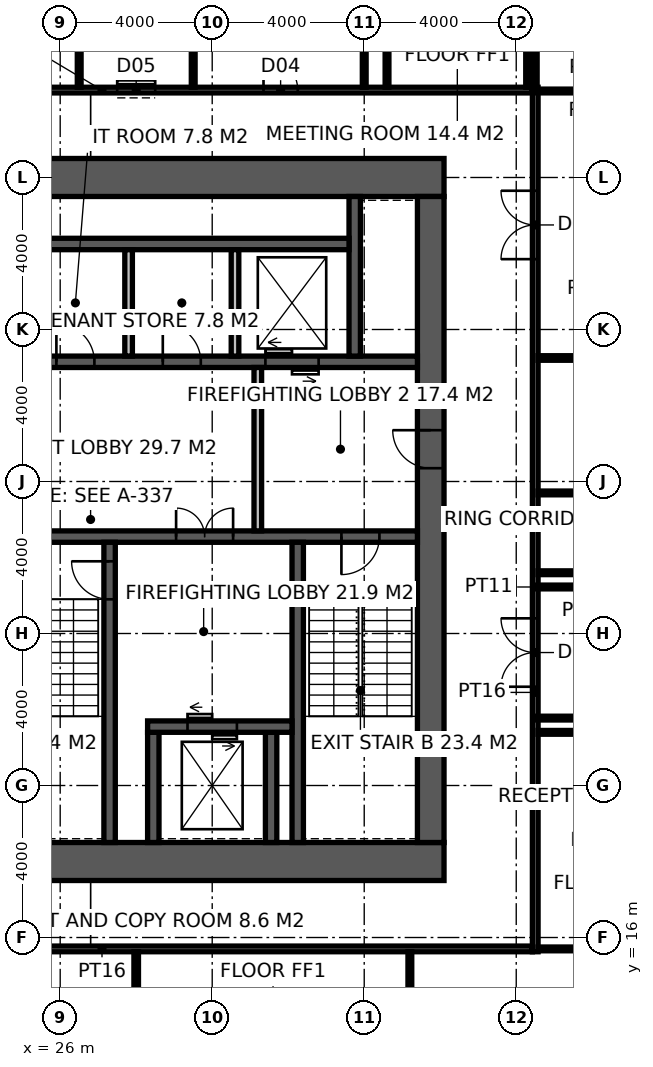
"""IFC4 building model, lengths in metres.
Left out: names, types, materials, properties, quantities, classifications, styles, units other than length and angle.
Written with IfcOpenShell. Run it as: python <this file> out.ifc"""

import sys

from ifc_helpers import new_model, si_unit, direction, frame, frame_2d, origin, place, context, subcontext, project, spatial, rectangle, extrude, element, fill, save


model = new_model("IFC4")
c1 = context("Model", 3, precision=1e-05, world=origin(), true_north=direction((0.0, 1.0)))
c2 = subcontext(c1, "Body", "Model", "MODEL_VIEW")
j1 = project(units=[si_unit("LENGTHUNIT", "METRE"), si_unit("PLANEANGLEUNIT", "RADIAN")], contexts=[c1])
p1 = place(None, origin())
s1 = spatial("IfcSite", under=j1, at=p1, CompositionType="ELEMENT")
p2 = place(p1, origin())
s2 = spatial("IfcBuilding", under=s1, at=p2, CompositionType="ELEMENT")
p3 = place(p2, frame((0.0, 0.0, 234.2)))
s3 = spatial("IfcBuildingStorey", under=s2, at=p3, CompositionType="ELEMENT", Elevation=234.2)
p4 = place(p3, frame((18.5, 18.0, -0.15), z_axis=(0.0, 0.0, 1.0), x_axis=(1.0, 0.0, 0.0)))
e1 = element("IfcWall", 1, at=p4, inside=s3, PredefinedType="SHEAR", context=c2, shape_type="SweptSolid", body=[
    extrude(rectangle(XDim=17.6, YDim=1.0, at=frame_2d((8.8, 0.0))), origin(), (0.0, 0.0, 1.0), 4.0),
])
p5 = place(p4, frame((3.45, 0.0, 0.15)))
e2 = element("IfcOpeningElement", 2, at=p5, cuts=e1, PredefinedType="OPENING", context=c2, shape_type="SweptSolid", body=[
    extrude(rectangle(XDim=1.5, YDim=2.4, at=frame_2d((0.75, 1.2))), frame((0.0, 0.51, 0.0), z_axis=(0.0, -1.0, 0.0), x_axis=(1.0, 0.0, 0.0)), (0.0, 0.0, 1.0), 1.02),
])
p6 = place(p3, frame((18.5, 36.0, -0.15), z_axis=(0.0, 0.0, 1.0), x_axis=(1.0, 0.0, 0.0)))
e3 = element("IfcWall", 3, at=p6, inside=s3, PredefinedType="SHEAR", context=c2, shape_type="SweptSolid", body=[
    extrude(rectangle(XDim=17.6, YDim=1.0, at=frame_2d((8.8, 0.0))), origin(), (0.0, 0.0, 1.0), 4.0),
])
p7 = place(p3, frame((35.75, 18.5, -0.15), z_axis=(0.0, 0.0, 1.0), x_axis=(0.0, 1.0, 0.0)))
e4 = element("IfcWall", 4, at=p7, inside=s3, PredefinedType="SHEAR", context=c2, shape_type="SweptSolid", body=[
    extrude(rectangle(XDim=17.0, YDim=0.7, at=frame_2d((8.5, 0.0))), origin(), (0.0, 0.0, 1.0), 4.0),
])
p8 = place(p7, frame((9.85, 0.0, 0.15)))
e5 = element("IfcOpeningElement", 5, at=p8, cuts=e4, PredefinedType="OPENING", context=c2, shape_type="SweptSolid", body=[
    extrude(rectangle(XDim=1.0, YDim=2.2, at=frame_2d((0.5, 1.1))), frame((0.0, 0.36, 0.0), z_axis=(0.0, -1.0, 0.0), x_axis=(1.0, 0.0, 0.0)), (0.0, 0.0, 1.0), 0.72),
])
p9 = place(p3, frame((24.15, 26.55, -0.15), z_axis=(0.0, 0.0, 1.0), x_axis=(1.0, 0.0, 0.0)))
e6 = element("IfcWall", 6, at=p9, inside=s3, PredefinedType="SHEAR", context=c2, shape_type="SweptSolid", body=[
    extrude(rectangle(XDim=11.25, YDim=0.3, at=frame_2d((5.625, 0.0))), origin(), (0.0, 0.0, 1.0), 4.0),
])
p10 = place(p9, frame((9.25, 0.0, 0.15)))
e7 = element("IfcOpeningElement", 7, at=p10, cuts=e6, PredefinedType="OPENING", context=c2, shape_type="SweptSolid", body=[
    extrude(rectangle(XDim=1.0, YDim=2.2, at=frame_2d((0.5, 1.1))), frame((0.0, 0.16, 0.0), z_axis=(0.0, -1.0, 0.0), x_axis=(1.0, 0.0, 0.0)), (0.0, 0.0, 1.0), 0.32),
])
p11 = place(p9, frame((4.9, 0.0, 0.15)))
e8 = element("IfcOpeningElement", 8, at=p11, cuts=e6, PredefinedType="OPENING", context=c2, shape_type="SweptSolid", body=[
    extrude(rectangle(XDim=1.5, YDim=2.4, at=frame_2d((0.75, 1.2))), frame((0.0, 0.16, 0.0), z_axis=(0.0, -1.0, 0.0), x_axis=(1.0, 0.0, 0.0)), (0.0, 0.0, 1.0), 0.32),
])
p12 = place(p3, frame((27.3, 18.5, -0.15), z_axis=(0.0, 0.0, 1.0), x_axis=(0.0, 1.0, 0.0)))
e9 = element("IfcWall", 9, at=p12, inside=s3, PredefinedType="SHEAR", context=c2, shape_type="SweptSolid", body=[
    extrude(rectangle(XDim=7.9, YDim=0.3, at=frame_2d((3.95, 0.0))), origin(), (0.0, 0.0, 1.0), 4.0),
])
p13 = place(p12, frame((6.4, 0.0, 0.15)))
e10 = element("IfcOpeningElement", 10, at=p13, cuts=e9, PredefinedType="OPENING", context=c2, shape_type="SweptSolid", body=[
    extrude(rectangle(XDim=1.0, YDim=2.2, at=frame_2d((0.5, 1.1))), frame((0.0, 0.16, 0.0), z_axis=(0.0, -1.0, 0.0), x_axis=(1.0, 0.0, 0.0)), (0.0, 0.0, 1.0), 0.32),
])
p14 = place(p3, frame((32.25, 18.5, -0.15), z_axis=(0.0, 0.0, 1.0), x_axis=(0.0, 1.0, 0.0)))
e11 = element("IfcWall", 11, at=p14, inside=s3, PredefinedType="SHEAR", context=c2, shape_type="SweptSolid", body=[
    extrude(rectangle(XDim=7.9, YDim=0.3, at=frame_2d((3.95, 0.0))), origin(), (0.0, 0.0, 1.0), 4.0),
])
for number, where, z_axis, x_axis in (
    (12, (28.45, 18.5, -0.15), (0.0, 0.0, 1.0), (0.0, 1.0, 0.0)),
    (13, (31.55, 18.5, -0.15), (0.0, 0.0, 1.0), (0.0, 1.0, 0.0)),
):
    element("IfcWall", number, at=place(p3, frame(where, z_axis=z_axis, x_axis=x_axis)), inside=s3, PredefinedType="SHEAR", context=c2, shape_type="SweptSolid", body=[
        extrude(rectangle(XDim=2.9, YDim=0.3, at=frame_2d((1.45, 0.0))), origin(), (0.0, 0.0, 1.0), 4.0),
    ])
p15 = place(p3, frame((28.3, 21.55, -0.15), z_axis=(0.0, 0.0, 1.0), x_axis=(1.0, 0.0, 0.0)))
e14 = element("IfcWall", 14, at=p15, inside=s3, PredefinedType="SHEAR", context=c2, shape_type="SweptSolid", body=[
    extrude(rectangle(XDim=3.8, YDim=0.3, at=frame_2d((1.9, 0.0))), origin(), (0.0, 0.0, 1.0), 4.0),
])
p16 = place(p15, frame((1.05, 0.0, 0.15)))
e15 = element("IfcOpeningElement", 15, at=p16, cuts=e14, PredefinedType="OPENING", context=c2, shape_type="SweptSolid", body=[
    extrude(rectangle(XDim=1.3, YDim=2.4, at=frame_2d((0.65, 1.2))), frame((0.0, 0.16, 0.0), z_axis=(0.0, -1.0, 0.0), x_axis=(1.0, 0.0, 0.0)), (0.0, 0.0, 1.0), 0.32),
])
p17 = place(p3, frame((24.15, 31.15, -0.15), z_axis=(0.0, 0.0, 1.0), x_axis=(1.0, 0.0, 0.0)))
e16 = element("IfcWall", 16, at=p17, inside=s3, PredefinedType="SHEAR", context=c2, shape_type="SweptSolid", body=[
    extrude(rectangle(XDim=11.25, YDim=0.3, at=frame_2d((5.625, 0.0))), origin(), (0.0, 0.0, 1.0), 4.0),
])
p18 = place(p17, frame((1.75, 0.0, 0.15)))
e17 = element("IfcOpeningElement", 17, at=p18, cuts=e16, PredefinedType="OPENING", context=c2, shape_type="SweptSolid", body=[
    extrude(rectangle(XDim=1.0, YDim=2.2, at=frame_2d((0.5, 1.1))), frame((0.0, 0.16, 0.0), z_axis=(0.0, -1.0, 0.0), x_axis=(1.0, 0.0, 0.0)), (0.0, 0.0, 1.0), 0.32),
])
p19 = place(p17, frame((4.55, 0.0, 0.15)))
e18 = element("IfcOpeningElement", 18, at=p19, cuts=e16, PredefinedType="OPENING", context=c2, shape_type="SweptSolid", body=[
    extrude(rectangle(XDim=1.0, YDim=2.2, at=frame_2d((0.5, 1.1))), frame((0.0, 0.16, 0.0), z_axis=(0.0, -1.0, 0.0), x_axis=(1.0, 0.0, 0.0)), (0.0, 0.0, 1.0), 0.32),
])
p20 = place(p17, frame((7.25, 0.0, 0.15)))
e19 = element("IfcOpeningElement", 19, at=p20, cuts=e16, PredefinedType="OPENING", context=c2, shape_type="SweptSolid", body=[
    extrude(rectangle(XDim=1.4, YDim=2.4, at=frame_2d((0.7, 1.2))), frame((0.0, 0.16, 0.0), z_axis=(0.0, -1.0, 0.0), x_axis=(1.0, 0.0, 0.0)), (0.0, 0.0, 1.0), 0.32),
])
p21 = place(p3, frame((33.75, 31.3, -0.15), z_axis=(0.0, 0.0, 1.0), x_axis=(0.0, 1.0, 0.0)))
e20 = element("IfcWall", 20, at=p21, inside=s3, PredefinedType="SHEAR", context=c2, shape_type="SweptSolid", body=[
    extrude(rectangle(XDim=4.2, YDim=0.3, at=frame_2d((2.1, 0.0))), origin(), (0.0, 0.0, 1.0), 4.0),
])
p22 = place(p3, frame((25.0, 34.25, -0.15), z_axis=(0.0, 0.0, 1.0), x_axis=(1.0, 0.0, 0.0)))
e21 = element("IfcWall", 21, at=p22, inside=s3, PredefinedType="SHEAR", context=c2, shape_type="SweptSolid", body=[
    extrude(rectangle(XDim=8.6, YDim=0.3, at=frame_2d((4.3, 0.0))), origin(), (0.0, 0.0, 1.0), 4.0),
])
for number, where, z_axis, x_axis in (
    (22, (27.8, 31.3, -0.15), (0.0, 0.0, 1.0), (0.0, 1.0, 0.0)),
    (23, (30.6, 31.3, -0.15), (0.0, 0.0, 1.0), (0.0, 1.0, 0.0)),
):
    element("IfcWall", number, at=place(p3, frame(where, z_axis=z_axis, x_axis=x_axis)), inside=s3, PredefinedType="SOLIDWALL", context=c2, shape_type="SweptSolid", body=[
        extrude(rectangle(XDim=2.8, YDim=0.2, at=frame_2d((1.4, 0.0))), origin(), (0.0, 0.0, 1.0), 4.0),
    ])
p23 = place(p3, frame((31.2, 26.7, 0.0), z_axis=(0.0, 0.0, 1.0), x_axis=(0.0, 1.0, 0.0)))
e24 = element("IfcWall", 24, at=p23, inside=s3, PredefinedType="SOLIDWALL", context=c2, shape_type="SweptSolid", body=[
    extrude(rectangle(XDim=4.3, YDim=0.2, at=frame_2d((2.15, 0.0))), origin(), (0.0, 0.0, 1.0), 3.85),
])
p24 = place(p3, frame((38.5, 15.625, 0.0), z_axis=(0.0, 0.0, 1.0), x_axis=(0.0, 1.0, 0.0)))
e25 = element("IfcWall", 25, at=p24, inside=s3, PredefinedType="PARTITIONING", context=c2, shape_type="SweptSolid", body=[
    extrude(rectangle(XDim=22.75, YDim=0.15, at=frame_2d((11.375, 0.0))), origin(), (0.0, 0.0, 1.0), 2.65),
])
p25 = place(p24, frame((6.974, 0.0, 0.0)))
e26 = element("IfcOpeningElement", 26, at=p25, cuts=e25, PredefinedType="OPENING", context=c2, shape_type="SweptSolid", body=[
    extrude(rectangle(XDim=1.8, YDim=2.4, at=frame_2d((0.9, 1.2))), frame((0.0, 0.085, 0.0), z_axis=(0.0, -1.0, 0.0), x_axis=(1.0, 0.0, 0.0)), (0.0, 0.0, 1.0), 0.17),
])
p26 = place(p24, frame((18.226, 0.0, 0.0)))
e27 = element("IfcOpeningElement", 27, at=p26, cuts=e25, PredefinedType="OPENING", context=c2, shape_type="SweptSolid", body=[
    extrude(rectangle(XDim=1.8, YDim=2.4, at=frame_2d((0.9, 1.2))), frame((0.0, 0.085, 0.0), z_axis=(0.0, -1.0, 0.0), x_axis=(1.0, 0.0, 0.0)), (0.0, 0.0, 1.0), 0.17),
])
p27 = place(p3, frame((15.775, 15.7, 0.0), z_axis=(0.0, 0.0, 1.0), x_axis=(1.0, 0.0, 0.0)))
e28 = element("IfcWall", 28, at=p27, inside=s3, PredefinedType="PARTITIONING", context=c2, shape_type="SweptSolid", body=[
    extrude(rectangle(XDim=22.65, YDim=0.15, at=frame_2d((11.325, 0.0))), origin(), (0.0, 0.0, 1.0), 3.85),
])
p28 = place(p3, frame((15.775, 38.3, 0.0), z_axis=(0.0, 0.0, 1.0), x_axis=(1.0, 0.0, 0.0)))
e29 = element("IfcWall", 29, at=p28, inside=s3, PredefinedType="PARTITIONING", context=c2, shape_type="SweptSolid", body=[
    extrude(rectangle(XDim=22.65, YDim=0.15, at=frame_2d((11.325, 0.0))), origin(), (0.0, 0.0, 1.0), 3.85),
])
p29 = place(p28, frame((7.975, 0.0, 0.0)))
e30 = element("IfcOpeningElement", 30, at=p29, cuts=e29, PredefinedType="OPENING", context=c2, shape_type="SweptSolid", body=[
    extrude(rectangle(XDim=0.9, YDim=2.1, at=frame_2d((0.45, 1.05))), frame((0.0, 0.085, 0.0), z_axis=(0.0, -1.0, 0.0), x_axis=(1.0, 0.0, 0.0)), (0.0, 0.0, 1.0), 0.17),
])
p30 = place(p28, frame((11.725, 0.0, 0.0)))
e31 = element("IfcOpeningElement", 31, at=p30, cuts=e29, PredefinedType="OPENING", context=c2, shape_type="SweptSolid", body=[
    extrude(rectangle(XDim=1.0, YDim=2.1, at=frame_2d((0.5, 1.05))), frame((0.0, 0.085, 0.0), z_axis=(0.0, -1.0, 0.0), x_axis=(1.0, 0.0, 0.0)), (0.0, 0.0, 1.0), 0.17),
])
p31 = place(p28, frame((15.575, 0.0, 0.0)))
e32 = element("IfcOpeningElement", 32, at=p31, cuts=e29, PredefinedType="OPENING", context=c2, shape_type="SweptSolid", body=[
    extrude(rectangle(XDim=0.9, YDim=2.1, at=frame_2d((0.45, 1.05))), frame((0.0, 0.085, 0.0), z_axis=(0.0, -1.0, 0.0), x_axis=(1.0, 0.0, 0.0)), (0.0, 0.0, 1.0), 0.17),
])
p32 = place(p3, frame((34.0, 38.375, 0.0), z_axis=(0.0, 0.0, 1.0), x_axis=(0.0, 1.0, 0.0)))
e33 = element("IfcWall", 33, at=p32, inside=s3, PredefinedType="PARTITIONING", context=c2, shape_type="SweptSolid", body=[
    extrude(rectangle(XDim=3.675, YDim=0.1, at=frame_2d((1.837, 0.0))), origin(), (0.0, 0.0, 1.0), 2.65),
])
for number, where, z_axis, x_axis in (
    (34, (26.5, 38.375, 0.0), (0.0, 0.0, 1.0), (0.0, 1.0, 0.0)),
    (35, (29.5, 38.375, 0.0), (0.0, 0.0, 1.0), (0.0, 1.0, 0.0)),
):
    element("IfcWall", number, at=place(p3, frame(where, z_axis=z_axis, x_axis=x_axis)), inside=s3, PredefinedType="PARTITIONING", context=c2, shape_type="SweptSolid", body=[
        extrude(rectangle(XDim=3.575, YDim=0.1, at=frame_2d((1.788, 0.0))), origin(), (0.0, 0.0, 1.0), 2.65),
    ])
p33 = place(p3, frame((28.0, 8.3, 0.0), z_axis=(0.0, 0.0, 1.0), x_axis=(0.0, 1.0, 0.0)))
e36 = element("IfcWall", 36, at=p33, inside=s3, PredefinedType="PARTITIONING", context=c2, shape_type="SweptSolid", body=[
    extrude(rectangle(XDim=7.325, YDim=0.12, at=frame_2d((3.663, 0.0))), origin(), (0.0, 0.0, 1.0), 3.85),
])
p34 = place(p3, frame((38.575, 31.25, 0.0), z_axis=(0.0, 0.0, 1.0), x_axis=(1.0, 0.0, 0.0)))
e37 = element("IfcWall", 37, at=p34, inside=s3, PredefinedType="PARTITIONING", context=c2, shape_type="SweptSolid", body=[
    extrude(rectangle(XDim=11.125, YDim=0.12, at=frame_2d((5.562, 0.0))), origin(), (0.0, 0.0, 1.0), 3.85),
])
for number, where, z_axis, x_axis in (
    (38, (38.575, 15.7, 0.0), (0.0, 0.0, 1.0), (1.0, 0.0, 0.0)),
    (39, (38.575, 21.399, 0.0), (0.0, 0.0, 1.0), (1.0, 0.0, 0.0)),
    (40, (38.575, 25.599, 0.0), (0.0, 0.0, 1.0), (1.0, 0.0, 0.0)),
):
    element("IfcWall", number, at=place(p3, frame(where, z_axis=z_axis, x_axis=x_axis)), inside=s3, PredefinedType="PARTITIONING", context=c2, shape_type="SweptSolid", body=[
        extrude(rectangle(XDim=5.975, YDim=0.1, at=frame_2d((2.988, 0.0))), origin(), (0.0, 0.0, 1.0), 3.85),
    ])
p35 = place(p3, frame((38.575, 27.699, 0.0), z_axis=(0.0, 0.0, 1.0), x_axis=(1.0, 0.0, 0.0)))
e41 = element("IfcWall", 41, at=p35, inside=s3, PredefinedType="PARTITIONING", context=c2, shape_type="SweptSolid", body=[
    extrude(rectangle(XDim=5.975, YDim=0.1, at=frame_2d((2.988, 0.0))), origin(), (0.0, 0.0, 1.0), 2.65),
])
p36 = place(p3, frame((34.6, 38.375, 0.0), z_axis=(0.0, 0.0, 1.0), x_axis=(0.0, 1.0, 0.0)))
e42 = element("IfcWall", 42, at=p36, inside=s3, PredefinedType="PARTITIONING", context=c2, shape_type="SweptSolid", body=[
    extrude(rectangle(XDim=4.075, YDim=0.1, at=frame_2d((2.038, 0.0))), origin(), (0.0, 0.0, 1.0), 2.65),
])
p37 = place(p3, frame((35.201, 12.15, 0.0), z_axis=(0.0, 0.0, 1.0), x_axis=(0.0, 1.0, 0.0)))
e43 = element("IfcWall", 43, at=p37, inside=s3, PredefinedType="PARTITIONING", context=c2, shape_type="SweptSolid", body=[
    extrude(rectangle(XDim=3.475, YDim=0.1, at=frame_2d((1.738, 0.0))), origin(), (0.0, 0.0, 1.0), 3.85),
])
p38 = place(p3, frame((38.3, 38.375, 0.0), z_axis=(0.0, 0.0, 1.0), x_axis=(0.0, 1.0, 0.0)))
e44 = element("IfcWall", 44, at=p38, inside=s3, PredefinedType="PARTITIONING", context=c2, shape_type="SweptSolid", body=[
    extrude(rectangle(XDim=4.075, YDim=0.1, at=frame_2d((2.038, 0.0))), origin(), (0.0, 0.0, 1.0), 2.65),
])
for number, where, z_axis, x_axis in (
    (45, (38.5, 21.774, 0.0), (0.0, 0.0, 1.0), (1.0, 0.0, 0.0)),
    (46, (41.65, 25.224, 0.0), (0.0, 0.0, 1.0), (-1.0, 0.0, 0.0)),
):
    element("IfcWall", number, at=place(p3, frame(where, z_axis=z_axis, x_axis=x_axis)), inside=s3, PredefinedType="PARTITIONING", context=c2, shape_type="SweptSolid", body=[
        extrude(rectangle(XDim=3.15, YDim=0.1, at=frame_2d((1.575, 0.0))), origin(), (0.0, 0.0, 1.0), 3.85),
    ])
p39 = place(p3, frame((38.5, 38.276, 0.0), z_axis=(0.0, 0.0, 1.0), x_axis=(1.0, 0.0, 0.0)))
e47 = element("IfcWall", 47, at=p39, inside=s3, PredefinedType="PARTITIONING", context=c2, shape_type="SweptSolid", body=[
    extrude(rectangle(XDim=3.05, YDim=0.1, at=frame_2d((1.525, 0.0))), origin(), (0.0, 0.0, 1.0), 3.85),
])
p40 = place(p3, frame((38.5, 43.826, 0.0), z_axis=(0.0, 0.0, 1.0), x_axis=(0.0, -1.0, 0.0)))
e48 = element("IfcWall", 48, at=p40, inside=s3, PredefinedType="PARTITIONING", context=c2, shape_type="SweptSolid", body=[
    extrude(rectangle(XDim=5.526, YDim=0.1, at=frame_2d((2.763, 0.0))), origin(), (0.0, 0.0, 1.0), 2.65),
])
p41 = place(p13, origin())
e49 = element("IfcDoor", 49, at=p41, inside=s3, OperationType="SINGLE_SWING_RIGHT", PredefinedType="DOOR", context=c2, shape_type="SweptSolid", body=[
    extrude(rectangle(XDim=1.0, YDim=2.2, at=frame_2d((0.5, 1.1))), frame((0.0, 0.025, 0.0), z_axis=(0.0, -1.0, 0.0), x_axis=(1.0, 0.0, 0.0)), (0.0, 0.0, 1.0), 0.05),
])
fill(e10, e49)
p42 = place(p10, frame((1.0, 0.0, 0.0), z_axis=(0.0, 0.0, 1.0), x_axis=(-1.0, 0.0, 0.0)))
e50 = element("IfcDoor", 50, at=p42, inside=s3, OperationType="SINGLE_SWING_RIGHT", PredefinedType="DOOR", context=c2, shape_type="SweptSolid", body=[
    extrude(rectangle(XDim=1.0, YDim=2.2, at=frame_2d((0.5, 1.1))), frame((0.0, 0.025, 0.0), z_axis=(0.0, -1.0, 0.0), x_axis=(1.0, 0.0, 0.0)), (0.0, 0.0, 1.0), 0.05),
])
fill(e7, e50)
p43 = place(p8, origin())
e51 = element("IfcDoor", 51, at=p43, inside=s3, OperationType="SINGLE_SWING_RIGHT", PredefinedType="DOOR", context=c2, shape_type="SweptSolid", body=[
    extrude(rectangle(XDim=1.0, YDim=2.2, at=frame_2d((0.5, 1.1))), frame((0.0, 0.025, 0.0), z_axis=(0.0, -1.0, 0.0), x_axis=(1.0, 0.0, 0.0)), (0.0, 0.0, 1.0), 0.05),
])
fill(e5, e51)
p44 = place(p11, origin())
e52 = element("IfcDoor", 52, at=p44, inside=s3, OperationType="DOUBLE_DOOR_DOUBLE_SWING", PredefinedType="DOOR", context=c2, shape_type="SweptSolid", body=[
    extrude(rectangle(XDim=1.5, YDim=2.4, at=frame_2d((0.75, 1.2))), frame((0.0, 0.025, 0.0), z_axis=(0.0, -1.0, 0.0), x_axis=(1.0, 0.0, 0.0)), (0.0, 0.0, 1.0), 0.05),
])
fill(e8, e52)
p45 = place(p18, origin())
e53 = element("IfcDoor", 53, at=p45, inside=s3, OperationType="SINGLE_SWING_LEFT", PredefinedType="DOOR", context=c2, shape_type="SweptSolid", body=[
    extrude(rectangle(XDim=1.0, YDim=2.2, at=frame_2d((0.5, 1.1))), frame((0.0, 0.025, 0.0), z_axis=(0.0, -1.0, 0.0), x_axis=(1.0, 0.0, 0.0)), (0.0, 0.0, 1.0), 0.05),
])
fill(e17, e53)
p46 = place(p19, origin())
e54 = element("IfcDoor", 54, at=p46, inside=s3, OperationType="SINGLE_SWING_LEFT", PredefinedType="DOOR", context=c2, shape_type="SweptSolid", body=[
    extrude(rectangle(XDim=1.0, YDim=2.2, at=frame_2d((0.5, 1.1))), frame((0.0, 0.025, 0.0), z_axis=(0.0, -1.0, 0.0), x_axis=(1.0, 0.0, 0.0)), (0.0, 0.0, 1.0), 0.05),
])
fill(e18, e54)
p47 = place(p30, origin())
e55 = element("IfcDoor", 55, at=p47, inside=s3, OperationType="SLIDING_TO_LEFT", PredefinedType="DOOR", context=c2, shape_type="SweptSolid", body=[
    extrude(rectangle(XDim=1.0, YDim=2.1, at=frame_2d((0.5, 1.05))), frame((0.0, 0.025, 0.0), z_axis=(0.0, -1.0, 0.0), x_axis=(1.0, 0.0, 0.0)), (0.0, 0.0, 1.0), 0.05),
])
fill(e31, e55)
p48 = place(p31, origin())
e56 = element("IfcDoor", 56, at=p48, inside=s3, OperationType="SINGLE_SWING_LEFT", PredefinedType="DOOR", context=c2, shape_type="SweptSolid", body=[
    extrude(rectangle(XDim=0.9, YDim=2.1, at=frame_2d((0.45, 1.05))), frame((0.0, 0.025, 0.0), z_axis=(0.0, -1.0, 0.0), x_axis=(1.0, 0.0, 0.0)), (0.0, 0.0, 1.0), 0.05),
])
fill(e32, e56)
p49 = place(p25, origin())
e57 = element("IfcDoor", 57, at=p49, inside=s3, OperationType="DOUBLE_DOOR_DOUBLE_SWING", PredefinedType="DOOR", context=c2, shape_type="SweptSolid", body=[
    extrude(rectangle(XDim=1.8, YDim=2.4, at=frame_2d((0.9, 1.2))), frame((0.0, 0.025, 0.0), z_axis=(0.0, -1.0, 0.0), x_axis=(1.0, 0.0, 0.0)), (0.0, 0.0, 1.0), 0.05),
])
fill(e26, e57)
p50 = place(p26, origin())
e58 = element("IfcDoor", 58, at=p50, inside=s3, OperationType="DOUBLE_DOOR_DOUBLE_SWING", PredefinedType="DOOR", context=c2, shape_type="SweptSolid", body=[
    extrude(rectangle(XDim=1.8, YDim=2.4, at=frame_2d((0.9, 1.2))), frame((0.0, 0.025, 0.0), z_axis=(0.0, -1.0, 0.0), x_axis=(1.0, 0.0, 0.0)), (0.0, 0.0, 1.0), 0.05),
])
fill(e27, e58)
p51 = place(p16, origin())
e59 = element("IfcDoor", 59, at=p51, inside=s3, OperationType="DOUBLE_DOOR_SLIDING", PredefinedType="DOOR", context=c2, shape_type="SweptSolid", body=[
    extrude(rectangle(XDim=1.3, YDim=2.4, at=frame_2d((0.65, 1.2))), frame((0.0, 0.025, 0.0), z_axis=(0.0, -1.0, 0.0), x_axis=(1.0, 0.0, 0.0)), (0.0, 0.0, 1.0), 0.05),
])
fill(e15, e59)
p52 = place(p20, origin())
e60 = element("IfcDoor", 60, at=p52, inside=s3, OperationType="DOUBLE_DOOR_SLIDING", PredefinedType="DOOR", context=c2, shape_type="SweptSolid", body=[
    extrude(rectangle(XDim=1.4, YDim=2.4, at=frame_2d((0.7, 1.2))), frame((0.0, 0.025, 0.0), z_axis=(0.0, -1.0, 0.0), x_axis=(1.0, 0.0, 0.0)), (0.0, 0.0, 1.0), 0.05),
])
fill(e19, e60)
save(model, sys.argv[1])
